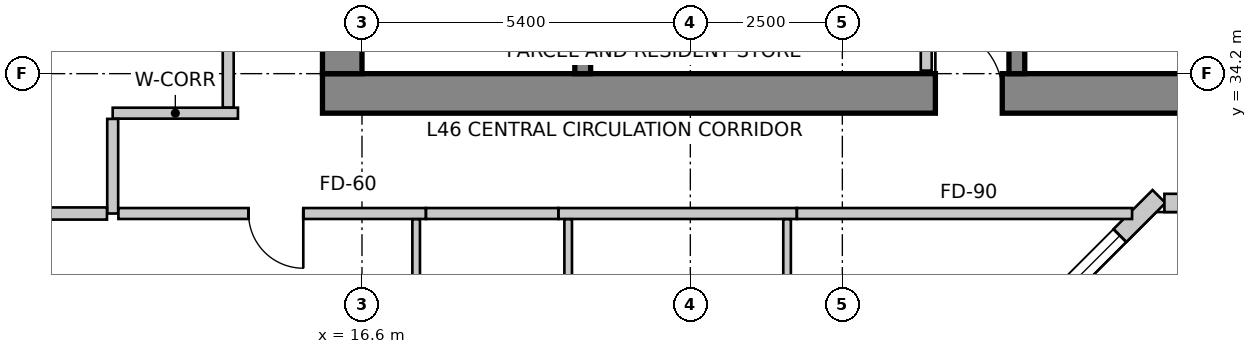
"""IFC4 building model, lengths in metres.
Left out: names, types, materials, properties, quantities, classifications, styles, units other than length and angle.
Written with IfcOpenShell. Run it as: python <this file> out.ifc"""

import sys

from ifc_helpers import new_model, si_unit, direction, frame, frame_2d, origin, place, context, subcontext, project, spatial, rectangle, extrude, source, transform, mapped, element, fill, save


model = new_model("IFC4")
c1 = context("Model", 3, precision=1e-05, world=origin(), true_north=direction((0.0, 1.0)))
c2 = subcontext(c1, "Body", "Model", "MODEL_VIEW")
j1 = project(units=[si_unit("LENGTHUNIT", "METRE"), si_unit("PLANEANGLEUNIT", "RADIAN")], contexts=[c1])
p1 = place(None, origin())
s1 = spatial("IfcSite", under=j1, at=p1, CompositionType="ELEMENT")
p2 = place(p1, origin())
s2 = spatial("IfcBuilding", under=s1, at=p2, CompositionType="ELEMENT")
p3 = place(p2, frame((0.0, 0.0, 186.9)))
s3 = spatial("IfcBuildingStorey", under=s2, at=p3, CompositionType="ELEMENT", Elevation=186.9)
p4 = place(p3, frame((15.95, 33.875, 0.0), z_axis=(0.0, 0.0, 1.0), x_axis=(1.0, 0.0, 0.0)))
e1 = element("IfcWall", 1, at=p4, inside=s3, PredefinedType="SHEAR", context=c2, shape_type="SweptSolid", body=[
    extrude(rectangle(XDim=15.7, YDim=0.65, at=frame_2d((7.85, 0.0))), origin(), (0.0, 0.0, 1.0), 3.5),
])
m1 = source(origin(), c2, "Body", "SweptSolid", [
    extrude(rectangle(XDim=1.1, YDim=2.15, at=frame_2d((0.55, 1.075))), frame((0.0, 0.335, 0.0), z_axis=(0.0, -1.0, 0.0), x_axis=(1.0, 0.0, 0.0)), (0.0, 0.0, 1.0), 0.67),
])
p5 = place(p4, frame((10.08, 0.0, 0.0)))
e2 = element("IfcOpeningElement", 2, at=p5, cuts=e1, PredefinedType="OPENING", context=c2, shape_type="MappedRepresentation", body=[
    mapped(m1, transform((0.0, 0.0, 0.0), scale=1.0)),
])
p6 = place(p3, frame((16.275, 34.2, 0.0), z_axis=(0.0, 0.0, 1.0), x_axis=(0.0, 1.0, 0.0)))
e3 = element("IfcWall", 3, at=p6, inside=s3, PredefinedType="SHEAR", context=c2, shape_type="SweptSolid", body=[
    extrude(rectangle(XDim=11.4, YDim=0.65, at=frame_2d((5.7, 0.0))), origin(), (0.0, 0.0, 1.0), 3.5),
])
p7 = place(p6, frame((7.15, 0.0, 0.0)))
e4 = element("IfcOpeningElement", 4, at=p7, cuts=e3, PredefinedType="OPENING", context=c2, shape_type="MappedRepresentation", body=[
    mapped(m1, transform((0.0, 0.0, 0.0), scale=1.0)),
])
p8 = place(p3, frame((20.23, 34.2, 0.0), z_axis=(0.0, 0.0, 1.0), x_axis=(0.0, 1.0, 0.0)))
e5 = element("IfcWall", 5, at=p8, inside=s3, PredefinedType="SHEAR", context=c2, shape_type="SweptSolid", body=[
    extrude(rectangle(XDim=9.06, YDim=0.26, at=frame_2d((4.53, 0.0))), origin(), (0.0, 0.0, 1.0), 3.5),
])
m2 = source(origin(), c2, "Body", "SweptSolid", [
    extrude(rectangle(XDim=1.1, YDim=2.15, at=frame_2d((0.55, 1.075))), frame((0.0, 0.14, 0.0), z_axis=(0.0, -1.0, 0.0), x_axis=(1.0, 0.0, 0.0)), (0.0, 0.0, 1.0), 0.28),
])
p9 = place(p8, frame((7.45, 0.0, 0.0)))
e6 = element("IfcOpeningElement", 6, at=p9, cuts=e5, PredefinedType="OPENING", context=c2, shape_type="MappedRepresentation", body=[
    mapped(m2, transform((0.0, 0.0, 0.0), scale=1.0)),
])
p10 = place(p3, frame((27.37, 34.2, 0.0), z_axis=(0.0, 0.0, 1.0), x_axis=(0.0, 1.0, 0.0)))
e7 = element("IfcWall", 7, at=p10, inside=s3, PredefinedType="SHEAR", context=c2, shape_type="SweptSolid", body=[
    extrude(rectangle(XDim=9.06, YDim=0.26, at=frame_2d((4.53, 0.0))), origin(), (0.0, 0.0, 1.0), 3.5),
])
p11 = place(p10, frame((7.45, 0.0, 0.0)))
e8 = element("IfcOpeningElement", 8, at=p11, cuts=e7, PredefinedType="OPENING", context=c2, shape_type="MappedRepresentation", body=[
    mapped(m2, transform((0.0, 0.0, 0.0), scale=1.0)),
])
p12 = place(p3, frame((27.652, 30.124, 0.0), z_axis=(0.0, 0.0, 1.0), x_axis=(0.707064797706, 0.707148762175, 0.0)))
e9 = element("IfcWall", 9, at=p12, inside=s3, PredefinedType="SOLIDWALL", context=c2, shape_type="SweptSolid", body=[
    extrude(rectangle(XDim=2.908, YDim=0.3, at=frame_2d((1.454, 0.0))), origin(), (0.0, 0.0, 1.0), 3.25),
])
m3 = source(origin(), c2, "Body", "SweptSolid", [
    extrude(rectangle(XDim=1.5, YDim=1.8, at=frame_2d((0.75, 0.9))), frame((0.0, 0.16, 0.0), z_axis=(0.0, -1.0, 0.0), x_axis=(1.0, 0.0, 0.0)), (0.0, 0.0, 1.0), 0.32),
])
p13 = place(p12, frame((0.498, 0.0, 0.85)))
e10 = element("IfcOpeningElement", 10, at=p13, cuts=e9, PredefinedType="OPENING", context=c2, shape_type="MappedRepresentation", body=[
    mapped(m3, transform((0.0, 0.0, 0.0), scale=1.0)),
])
p14 = place(p3, frame((29.797, 32.074, 0.0), z_axis=(0.0, 0.0, 1.0), x_axis=(1.0, 0.0, 0.0)))
e11 = element("IfcWall", 11, at=p14, inside=s3, PredefinedType="SOLIDWALL", context=c2, shape_type="SweptSolid", body=[
    extrude(rectangle(XDim=17.291, YDim=0.3, at=frame_2d((8.646, 0.0))), origin(), (0.0, 0.0, 1.0), 3.25),
])
m4 = source(origin(), c2, "Body", "SweptSolid", [
    extrude(rectangle(XDim=1.6, YDim=2.15, at=frame_2d((0.8, 1.075))), frame((0.0, 0.16, 0.0), z_axis=(0.0, -1.0, 0.0), x_axis=(1.0, 0.0, 0.0)), (0.0, 0.0, 1.0), 0.32),
])
p15 = place(p14, frame((4.053, 0.0, 0.0)))
e12 = element("IfcOpeningElement", 12, at=p15, cuts=e11, PredefinedType="OPENING", context=c2, shape_type="MappedRepresentation", body=[
    mapped(m4, transform((0.0, 0.0, 0.0), scale=1.0)),
])
m5 = source(origin(), c2, "Body", "SweptSolid", [
    extrude(rectangle(XDim=2.4, YDim=2.2, at=frame_2d((1.2, 1.1))), frame((0.0, 0.16, 0.0), z_axis=(0.0, -1.0, 0.0), x_axis=(1.0, 0.0, 0.0)), (0.0, 0.0, 1.0), 0.32),
])
p16 = place(p14, frame((0.526, 0.0, 0.85)))
e13 = element("IfcOpeningElement", 13, at=p16, cuts=e11, PredefinedType="OPENING", context=c2, shape_type="MappedRepresentation", body=[
    mapped(m5, transform((0.0, 0.0, 0.0), scale=1.0)),
])
p17 = place(p14, frame((8.511, 0.0, 0.85)))
e14 = element("IfcOpeningElement", 14, at=p17, cuts=e11, PredefinedType="OPENING", context=c2, shape_type="MappedRepresentation", body=[
    mapped(m5, transform((0.0, 0.0, 0.0), scale=1.0)),
])
p18 = place(p14, frame((14.055, 0.0, 0.85)))
e15 = element("IfcOpeningElement", 15, at=p18, cuts=e11, PredefinedType="OPENING", context=c2, shape_type="MappedRepresentation", body=[
    mapped(m5, transform((0.0, 0.0, 0.0), scale=1.0)),
])
p19 = place(p3, frame((13.269, 47.134, 0.0), z_axis=(0.0, 0.0, 1.0), x_axis=(-0.319920776449, -0.947444297464, 0.0)))
e16 = element("IfcWall", 16, at=p19, inside=s3, PredefinedType="SOLIDWALL", context=c2, shape_type="SweptSolid", body=[
    extrude(rectangle(XDim=16.133, YDim=0.3, at=frame_2d((8.067, 0.0))), origin(), (0.0, 0.0, 1.0), 3.25),
])
p20 = place(p19, frame((2.363, 0.0, 0.85)))
e17 = element("IfcOpeningElement", 17, at=p20, cuts=e16, PredefinedType="OPENING", context=c2, shape_type="MappedRepresentation", body=[
    mapped(m5, transform((0.0, 0.0, 0.0), scale=1.0)),
])
m6 = source(origin(), c2, "Body", "SweptSolid", [
    extrude(rectangle(XDim=2.1, YDim=2.0, at=frame_2d((1.05, 1.0))), frame((0.0, 0.16, 0.0), z_axis=(0.0, -1.0, 0.0), x_axis=(1.0, 0.0, 0.0)), (0.0, 0.0, 1.0), 0.32),
])
p21 = place(p19, frame((7.41, 0.0, 0.85)))
e18 = element("IfcOpeningElement", 18, at=p21, cuts=e16, PredefinedType="OPENING", context=c2, shape_type="MappedRepresentation", body=[
    mapped(m6, transform((0.0, 0.0, 0.0), scale=1.0)),
])
p22 = place(p19, frame((12.157, 0.0, 0.85)))
e19 = element("IfcOpeningElement", 19, at=p22, cuts=e16, PredefinedType="OPENING", context=c2, shape_type="MappedRepresentation", body=[
    mapped(m5, transform((0.0, 0.0, 0.0), scale=1.0)),
])
p23 = place(p3, frame((8.188, 31.834, 0.0), z_axis=(0.0, 0.0, 1.0), x_axis=(0.202303475707, -0.979322880217, 0.0)))
e20 = element("IfcWall", 20, at=p23, inside=s3, PredefinedType="SOLIDWALL", context=c2, shape_type="SweptSolid", body=[
    extrude(rectangle(XDim=15.766, YDim=0.3, at=frame_2d((7.883, 0.0))), origin(), (0.0, 0.0, 1.0), 3.25),
])
p24 = place(p23, frame((1.554, 0.0, 0.85)))
e21 = element("IfcOpeningElement", 21, at=p24, cuts=e20, PredefinedType="OPENING", context=c2, shape_type="MappedRepresentation", body=[
    mapped(m6, transform((0.0, 0.0, 0.0), scale=1.0)),
])
p25 = place(p23, frame((5.971, 0.0, 0.85)))
e22 = element("IfcOpeningElement", 22, at=p25, cuts=e20, PredefinedType="OPENING", context=c2, shape_type="MappedRepresentation", body=[
    mapped(m5, transform((0.0, 0.0, 0.0), scale=1.0)),
])
p26 = place(p23, frame((11.62, 0.0, 0.85)))
e23 = element("IfcOpeningElement", 23, at=p26, cuts=e20, PredefinedType="OPENING", context=c2, shape_type="MappedRepresentation", body=[
    mapped(m6, transform((0.0, 0.0, 0.0), scale=1.0)),
])
p27 = place(p3, frame((25.88, 35.956, 0.0), z_axis=(0.0, 0.0, 1.0), x_axis=(0.0, -1.0, 0.0)))
e24 = element("IfcWall", 24, at=p27, inside=s3, PredefinedType="PARTITIONING", context=c2, shape_type="SweptSolid", body=[
    extrude(rectangle(XDim=1.706, YDim=0.18, at=frame_2d((0.853, 0.0))), origin(), (0.0, 0.0, 1.0), 2.542),
])
p28 = place(p3, frame((12.5, 33.55, 0.0), z_axis=(0.0, 0.0, 1.0), x_axis=(1.0, 0.0, 0.0)))
e25 = element("IfcWall", 25, at=p28, inside=s3, PredefinedType="PARTITIONING", context=c2, shape_type="SweptSolid", body=[
    extrude(rectangle(XDim=2.06, YDim=0.18, at=frame_2d((1.03, 0.0))), origin(), (0.0, 0.0, 1.0), 3.25),
])
p29 = place(p3, frame((12.5, 31.9, 0.0), z_axis=(0.0, 0.0, 1.0), x_axis=(0.0, 1.0, 0.0)))
e26 = element("IfcWall", 26, at=p29, inside=s3, PredefinedType="PARTITIONING", context=c2, shape_type="SweptSolid", body=[
    extrude(rectangle(XDim=1.556, YDim=0.18, at=frame_2d((0.778, 0.0))), origin(), (0.0, 0.0, 1.0), 2.919),
])
p30 = place(p3, frame((23.751, 31.9, 0.0), z_axis=(0.0, 0.0, 1.0), x_axis=(-1.0, 0.0, 0.0)))
e27 = element("IfcWall", 27, at=p30, inside=s3, PredefinedType="PARTITIONING", context=c2, shape_type="SweptSolid", body=[
    extrude(rectangle(XDim=3.92, YDim=0.18, at=frame_2d((1.96, 0.0))), origin(), (0.0, 0.0, 1.0), 2.919),
])
p31 = place(p3, frame((29.265, 31.9, 0.0), z_axis=(0.0, 0.0, 1.0), x_axis=(-1.0, 0.0, 0.0)))
e28 = element("IfcWall", 28, at=p31, inside=s3, PredefinedType="PARTITIONING", context=c2, shape_type="SweptSolid", body=[
    extrude(rectangle(XDim=5.512, YDim=0.18, at=frame_2d((2.756, 0.0))), origin(), (0.0, 0.0, 1.0), 3.25),
])
p32 = place(p3, frame((17.651, 31.9, 0.0), z_axis=(0.0, 0.0, 1.0), x_axis=(-1.0, 0.0, 0.0)))
e29 = element("IfcWall", 29, at=p32, inside=s3, PredefinedType="PARTITIONING", context=c2, shape_type="SweptSolid", body=[
    extrude(rectangle(XDim=5.057, YDim=0.18, at=frame_2d((2.528, 0.0))), origin(), (0.0, 0.0, 1.0), 2.919),
])
m7 = source(origin(), c2, "Body", "SweptSolid", [
    extrude(rectangle(XDim=0.9, YDim=2.15, at=frame_2d((0.45, 1.075))), frame((0.0, 0.1, 0.0), z_axis=(0.0, -1.0, 0.0), x_axis=(1.0, 0.0, 0.0)), (0.0, 0.0, 1.0), 0.2),
])
p33 = place(p32, frame((2.017, 0.0, 0.0)))
e30 = element("IfcOpeningElement", 30, at=p33, cuts=e29, PredefinedType="OPENING", context=c2, shape_type="MappedRepresentation", body=[
    mapped(m7, transform((0.0, 0.0, 0.0), scale=1.0)),
])
p34 = place(p3, frame((19.829, 31.9, 0.0), z_axis=(0.0, 0.0, 1.0), x_axis=(-1.0, 0.0, 0.0)))
e31 = element("IfcWall", 31, at=p34, inside=s3, PredefinedType="PARTITIONING", context=c2, shape_type="SweptSolid", body=[
    extrude(rectangle(XDim=2.176, YDim=0.18, at=frame_2d((1.088, 0.0))), origin(), (0.0, 0.0, 1.0), 3.25),
])
p35 = place(p3, frame((14.4, 33.644, 0.0), z_axis=(0.0, 0.0, 1.0), x_axis=(0.0, 1.0, 0.0)))
e32 = element("IfcWall", 32, at=p35, inside=s3, PredefinedType="PARTITIONING", context=c2, shape_type="SweptSolid", body=[
    extrude(rectangle(XDim=12.606, YDim=0.18, at=frame_2d((6.303, 0.0))), origin(), (0.0, 0.0, 1.0), 3.25),
])
p36 = place(p35, frame((4.399, 0.0, 0.0)))
e33 = element("IfcOpeningElement", 33, at=p36, cuts=e32, PredefinedType="OPENING", context=c2, shape_type="MappedRepresentation", body=[
    mapped(m7, transform((0.0, 0.0, 0.0), scale=1.0)),
])
p37 = place(p3, frame((12.406, 31.9, 0.0), z_axis=(0.0, 0.0, 1.0), x_axis=(-1.0, 0.0, 0.0)))
e34 = element("IfcWall", 34, at=p37, inside=s3, PredefinedType="PARTITIONING", context=c2, shape_type="SweptSolid", body=[
    extrude(rectangle(XDim=4.115, YDim=0.2, at=frame_2d((2.057, 0.0))), origin(), (0.0, 0.0, 1.0), 2.542),
])
p38 = place(p3, frame((23.591, 31.806, 0.0), z_axis=(0.0, 0.0, 1.0), x_axis=(0.0, -1.0, 0.0)))
e35 = element("IfcWall", 35, at=p38, inside=s3, PredefinedType="PARTITIONING", context=c2, shape_type="SweptSolid", body=[
    extrude(rectangle(XDim=9.423, YDim=0.125, at=frame_2d((4.711, 0.0))), origin(), (0.0, 0.0, 1.0), 2.542),
])
m8 = source(origin(), c2, "Body", "SweptSolid", [
    extrude(rectangle(XDim=0.9, YDim=2.15, at=frame_2d((0.45, 1.075))), frame((0.0, 0.073, 0.0), z_axis=(0.0, -1.0, 0.0), x_axis=(1.0, 0.0, 0.0)), (0.0, 0.0, 1.0), 0.145),
])
p39 = place(p38, frame((5.106, 0.0, 0.0)))
e36 = element("IfcOpeningElement", 36, at=p39, cuts=e35, PredefinedType="OPENING", context=c2, shape_type="MappedRepresentation", body=[
    mapped(m8, transform((0.0, 0.0, 0.0), scale=1.0)),
])
p40 = place(p3, frame((19.991, 22.383, 0.0), z_axis=(0.0, 0.0, 1.0), x_axis=(0.0, 1.0, 0.0)))
e37 = element("IfcWall", 37, at=p40, inside=s3, PredefinedType="PARTITIONING", context=c2, shape_type="SweptSolid", body=[
    extrude(rectangle(XDim=9.423, YDim=0.125, at=frame_2d((4.711, 0.0))), origin(), (0.0, 0.0, 1.0), 2.766),
])
p41 = place(p40, frame((4.261, 0.0, 0.0)))
e38 = element("IfcOpeningElement", 38, at=p41, cuts=e37, PredefinedType="OPENING", context=c2, shape_type="MappedRepresentation", body=[
    mapped(m8, transform((0.0, 0.0, 0.0), scale=1.0)),
])
p42 = place(p3, frame((17.491, 31.806, 0.0), z_axis=(0.0, 0.0, 1.0), x_axis=(0.0, -1.0, 0.0)))
e39 = element("IfcWall", 39, at=p42, inside=s3, PredefinedType="PARTITIONING", context=c2, shape_type="SweptSolid", body=[
    extrude(rectangle(XDim=9.423, YDim=0.125, at=frame_2d((4.711, 0.0))), origin(), (0.0, 0.0, 1.0), 2.766),
])
m9 = source(origin(), c2, "Body", "SweptSolid", [
    extrude(rectangle(XDim=0.85, YDim=2.15, at=frame_2d((0.425, 1.075))), frame((0.0, 0.073, 0.0), z_axis=(0.0, -1.0, 0.0), x_axis=(1.0, 0.0, 0.0)), (0.0, 0.0, 1.0), 0.145),
])
p43 = place(p42, frame((4.287, 0.0, 0.0)))
e40 = element("IfcOpeningElement", 40, at=p43, cuts=e39, PredefinedType="OPENING", context=c2, shape_type="MappedRepresentation", body=[
    mapped(m9, transform((0.0, 0.0, 0.0), scale=1.0)),
])
m10 = source(origin(), c2, "Body", "SweptSolid", [
    extrude(rectangle(XDim=1.5, YDim=1.8, at=frame_2d((0.75, 0.9))), frame((0.0, -0.015, 0.0), z_axis=(0.0, -1.0, 0.0), x_axis=(1.0, 0.0, 0.0)), (0.0, 0.0, 1.0), 0.06),
])
p44 = place(p13, origin())
e41 = element("IfcWindow", 41, at=p44, inside=s3, PartitioningType="SINGLE_PANEL", PredefinedType="WINDOW", context=c2, shape_type="MappedRepresentation", body=[
    mapped(m10, transform((0.0, 0.0, 0.0), scale=1.0)),
])
fill(e10, e41)
m11 = source(origin(), c2, "Body", "SweptSolid", [
    extrude(rectangle(XDim=1.1, YDim=2.15, at=frame_2d((0.55, 1.075))), frame((0.0, 0.025, 0.0), z_axis=(0.0, -1.0, 0.0), x_axis=(1.0, 0.0, 0.0)), (0.0, 0.0, 1.0), 0.05),
])
p45 = place(p5, origin())
e42 = element("IfcDoor", 42, at=p45, inside=s3, OperationType="SINGLE_SWING_LEFT", PredefinedType="DOOR", context=c2, shape_type="MappedRepresentation", body=[
    mapped(m11, transform((0.0, 0.0, 0.0), scale=1.0)),
])
fill(e2, e42)
m12 = source(origin(), c2, "Body", "SweptSolid", [
    extrude(rectangle(XDim=0.9, YDim=2.15, at=frame_2d((0.45, 1.075))), frame((0.0, 0.025, 0.0), z_axis=(0.0, -1.0, 0.0), x_axis=(1.0, 0.0, 0.0)), (0.0, 0.0, 1.0), 0.05),
])
p46 = place(p33, origin())
e43 = element("IfcDoor", 43, at=p46, inside=s3, OperationType="SINGLE_SWING_LEFT", PredefinedType="DOOR", context=c2, shape_type="MappedRepresentation", body=[
    mapped(m12, transform((0.0, 0.0, 0.0), scale=1.0)),
])
fill(e30, e43)
save(model, sys.argv[1])
